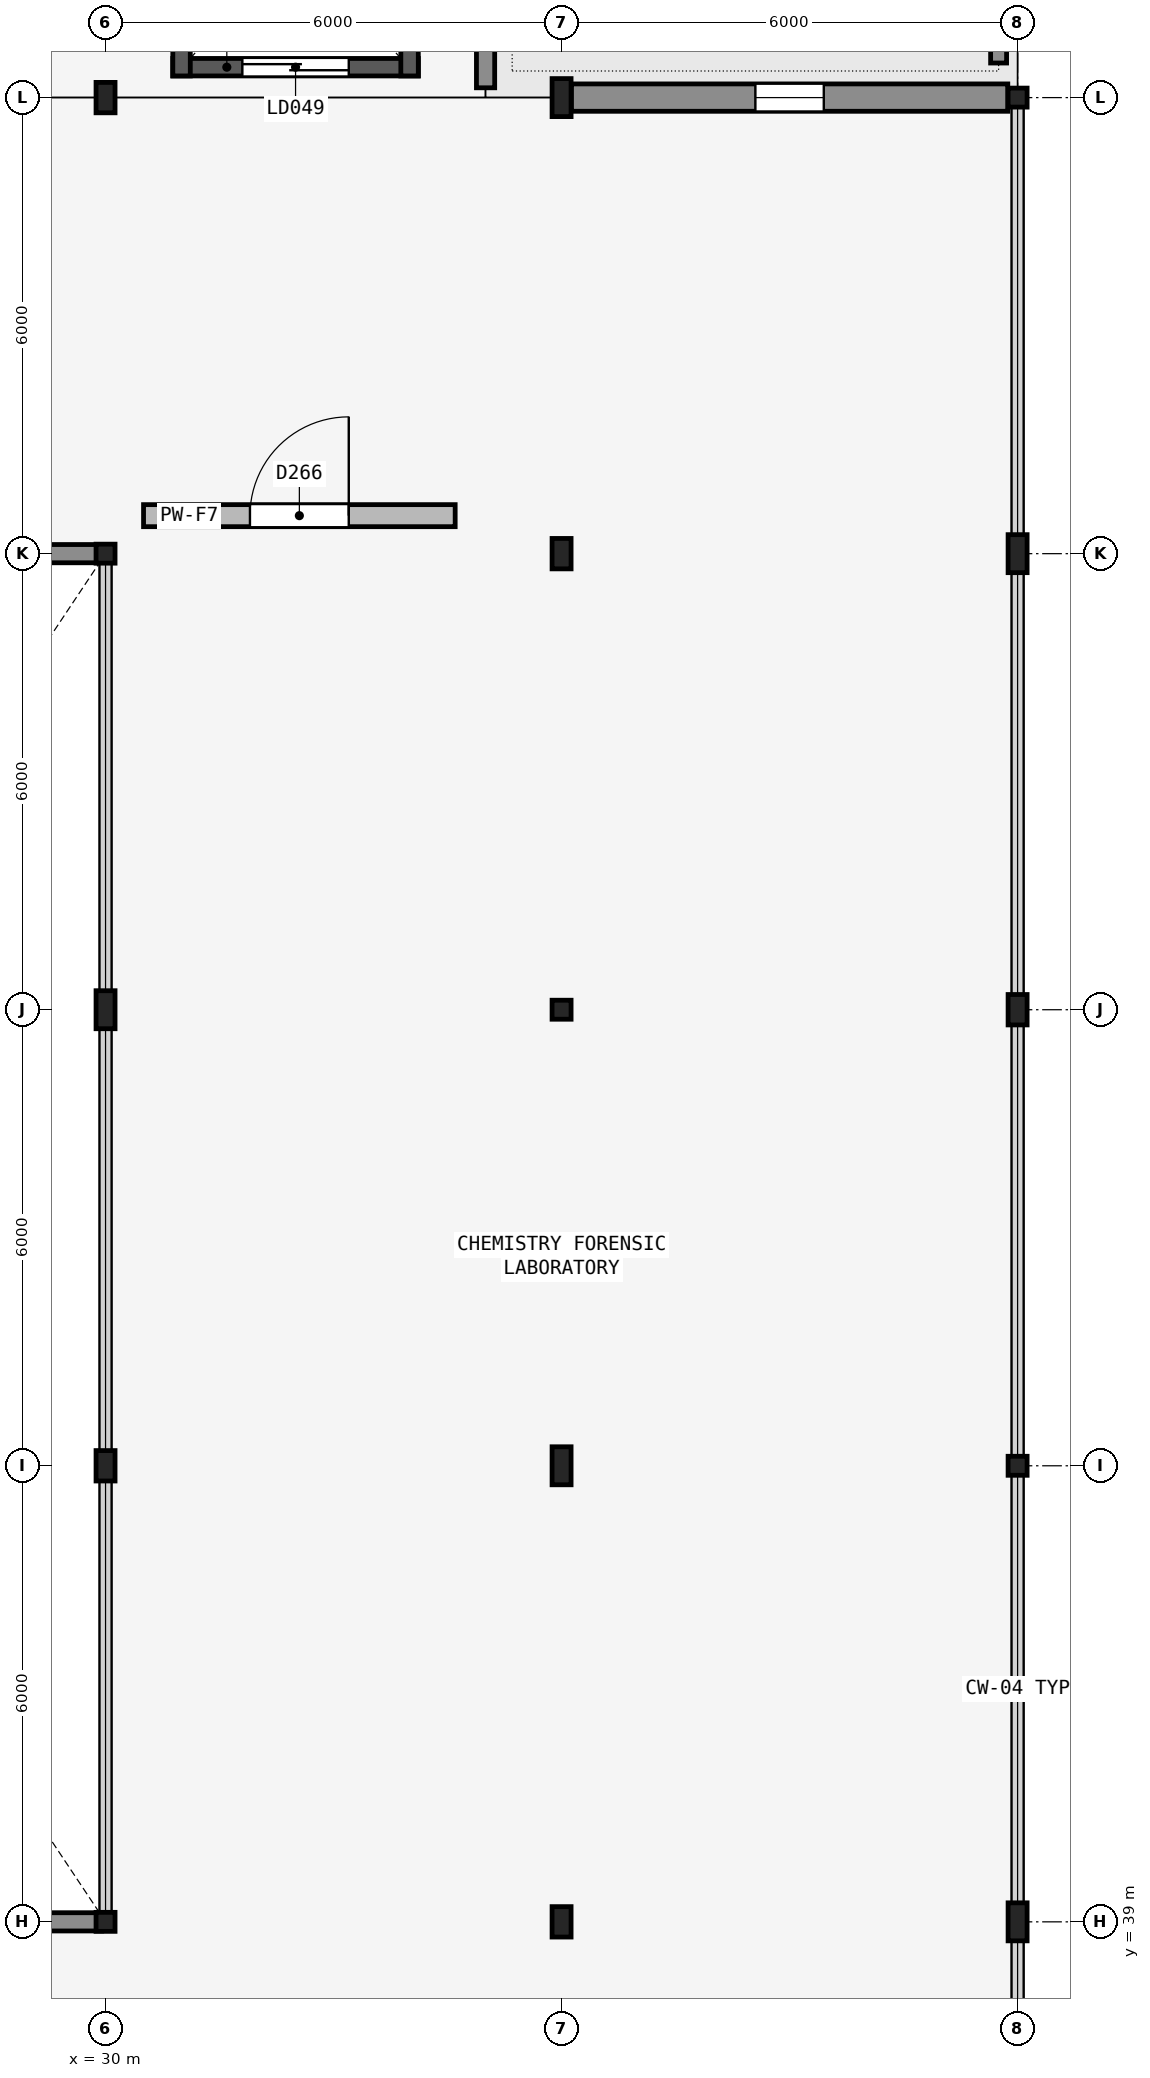
"""IFC4 building model, lengths in metres.
Left out: names, types, materials, properties, quantities, classifications, styles, units other than length and angle.
Written with IfcOpenShell. Run it as: python <this file> out.ifc"""

import sys

from ifc_helpers import new_model, si_unit, direction, frame, frame_2d, origin, origin_2d, place, context, subcontext, project, spatial, rectangle, hollow_rectangle, i_section, extrude, element, fill, save


model = new_model("IFC4")
c1 = context("Model", 3, precision=1e-05, world=origin(), true_north=direction((0.0, 1.0)))
c2 = subcontext(c1, "Body", "Model", "MODEL_VIEW")
j1 = project(units=[si_unit("LENGTHUNIT", "METRE"), si_unit("PLANEANGLEUNIT", "RADIAN")], contexts=[c1])
p1 = place(None, origin())
s1 = spatial("IfcSite", under=j1, at=p1, CompositionType="ELEMENT")
p2 = place(p1, origin())
s2 = spatial("IfcBuilding", under=s1, at=p2, CompositionType="ELEMENT")
p3 = place(p2, frame((0.0, 0.0, 18.0)))
s3 = spatial("IfcBuildingStorey", under=s2, at=p3, CompositionType="ELEMENT", Elevation=18.0)
p4 = place(p3, frame((30.0, 39.0, 0.0), z_axis=(0.0, 0.0, 1.0), x_axis=(1.0, 0.0, 0.0)))
e1 = element("IfcColumn", 1, at=p4, inside=s3, PredefinedType="COLUMN", context=c2, shape_type="SweptSolid", body=[
    extrude(hollow_rectangle(XDim=0.25, YDim=0.25, WallThickness=0.012, InnerFilletRadius=0.012, OuterFilletRadius=0.024, at=origin_2d()), origin(), (0.0, 0.0, 1.0), 4.2),
])
p5 = place(p3, frame((30.0, 45.0, 0.0), z_axis=(0.0, 0.0, 1.0), x_axis=(1.0, 0.0, 0.0)))
e2 = element("IfcColumn", 2, at=p5, inside=s3, PredefinedType="COLUMN", context=c2, shape_type="SweptSolid", body=[
    extrude(i_section(OverallWidth=0.25, OverallDepth=0.4, WebThickness=0.01, FlangeThickness=0.013, FilletRadius=0.014, at=origin_2d()), origin(), (0.0, 0.0, 1.0), 4.2),
])
p6 = place(p3, frame((30.0, 51.0, 0.0), z_axis=(0.0, 0.0, 1.0), x_axis=(1.0, 0.0, 0.0)))
e3 = element("IfcColumn", 3, at=p6, inside=s3, PredefinedType="COLUMN", context=c2, shape_type="SweptSolid", body=[
    extrude(i_section(OverallWidth=0.25, OverallDepth=0.5, WebThickness=0.01, FlangeThickness=0.015, FilletRadius=0.015, at=origin_2d()), origin(), (0.0, 0.0, 1.0), 4.2),
])
p7 = place(p3, frame((30.0, 57.0, 0.0), z_axis=(0.0, 0.0, 1.0), x_axis=(1.0, 0.0, 0.0)))
e4 = element("IfcColumn", 4, at=p7, inside=s3, PredefinedType="COLUMN", context=c2, shape_type="SweptSolid", body=[
    extrude(hollow_rectangle(XDim=0.25, YDim=0.25, WallThickness=0.012, InnerFilletRadius=0.012, OuterFilletRadius=0.024, at=origin_2d()), origin(), (0.0, 0.0, 1.0), 4.2),
])
for number, where, z_axis, x_axis in (
    (5, (30.0, 63.0, 0.0), (0.0, 0.0, 1.0), (1.0, 0.0, 0.0)),
    (6, (36.0, 39.0, 0.0), (0.0, 0.0, 1.0), (1.0, 0.0, 0.0)),
):
    element("IfcColumn", number, at=place(p3, frame(where, z_axis=z_axis, x_axis=x_axis)), inside=s3, PredefinedType="COLUMN", context=c2, shape_type="SweptSolid", body=[
        extrude(i_section(OverallWidth=0.25, OverallDepth=0.4, WebThickness=0.01, FlangeThickness=0.013, FilletRadius=0.014, at=origin_2d()), origin(), (0.0, 0.0, 1.0), 4.2),
    ])
p8 = place(p3, frame((36.0, 45.0, 0.0), z_axis=(0.0, 0.0, 1.0), x_axis=(1.0, 0.0, 0.0)))
e7 = element("IfcColumn", 7, at=p8, inside=s3, PredefinedType="COLUMN", context=c2, shape_type="SweptSolid", body=[
    extrude(i_section(OverallWidth=0.25, OverallDepth=0.5, WebThickness=0.01, FlangeThickness=0.015, FilletRadius=0.015, at=origin_2d()), origin(), (0.0, 0.0, 1.0), 4.2),
])
p9 = place(p3, frame((36.0, 51.0, 0.0), z_axis=(0.0, 0.0, 1.0), x_axis=(1.0, 0.0, 0.0)))
e8 = element("IfcColumn", 8, at=p9, inside=s3, PredefinedType="COLUMN", context=c2, shape_type="SweptSolid", body=[
    extrude(hollow_rectangle(XDim=0.25, YDim=0.25, WallThickness=0.012, InnerFilletRadius=0.012, OuterFilletRadius=0.024, at=origin_2d()), origin(), (0.0, 0.0, 1.0), 4.2),
])
p10 = place(p3, frame((36.0, 57.0, 0.0), z_axis=(0.0, 0.0, 1.0), x_axis=(1.0, 0.0, 0.0)))
e9 = element("IfcColumn", 9, at=p10, inside=s3, PredefinedType="COLUMN", context=c2, shape_type="SweptSolid", body=[
    extrude(i_section(OverallWidth=0.25, OverallDepth=0.4, WebThickness=0.01, FlangeThickness=0.013, FilletRadius=0.014, at=origin_2d()), origin(), (0.0, 0.0, 1.0), 4.2),
])
for number, where, z_axis, x_axis in (
    (10, (36.0, 63.0, 0.0), (0.0, 0.0, 1.0), (1.0, 0.0, 0.0)),
    (11, (42.0, 39.0, 0.0), (0.0, 0.0, 1.0), (1.0, 0.0, 0.0)),
):
    element("IfcColumn", number, at=place(p3, frame(where, z_axis=z_axis, x_axis=x_axis)), inside=s3, PredefinedType="COLUMN", context=c2, shape_type="SweptSolid", body=[
        extrude(i_section(OverallWidth=0.25, OverallDepth=0.5, WebThickness=0.01, FlangeThickness=0.015, FilletRadius=0.015, at=origin_2d()), origin(), (0.0, 0.0, 1.0), 4.2),
    ])
p11 = place(p3, frame((42.0, 45.0, 0.0), z_axis=(0.0, 0.0, 1.0), x_axis=(1.0, 0.0, 0.0)))
e12 = element("IfcColumn", 12, at=p11, inside=s3, PredefinedType="COLUMN", context=c2, shape_type="SweptSolid", body=[
    extrude(hollow_rectangle(XDim=0.25, YDim=0.25, WallThickness=0.012, InnerFilletRadius=0.012, OuterFilletRadius=0.024, at=origin_2d()), origin(), (0.0, 0.0, 1.0), 4.2),
])
p12 = place(p3, frame((42.0, 51.0, 0.0), z_axis=(0.0, 0.0, 1.0), x_axis=(1.0, 0.0, 0.0)))
e13 = element("IfcColumn", 13, at=p12, inside=s3, PredefinedType="COLUMN", context=c2, shape_type="SweptSolid", body=[
    extrude(i_section(OverallWidth=0.25, OverallDepth=0.4, WebThickness=0.01, FlangeThickness=0.013, FilletRadius=0.014, at=origin_2d()), origin(), (0.0, 0.0, 1.0), 4.2),
])
p13 = place(p3, frame((42.0, 57.0, 0.0), z_axis=(0.0, 0.0, 1.0), x_axis=(1.0, 0.0, 0.0)))
e14 = element("IfcColumn", 14, at=p13, inside=s3, PredefinedType="COLUMN", context=c2, shape_type="SweptSolid", body=[
    extrude(i_section(OverallWidth=0.25, OverallDepth=0.5, WebThickness=0.01, FlangeThickness=0.015, FilletRadius=0.015, at=origin_2d()), origin(), (0.0, 0.0, 1.0), 4.2),
])
p14 = place(p3, frame((42.0, 63.0, 0.0), z_axis=(0.0, 0.0, 1.0), x_axis=(1.0, 0.0, 0.0)))
e15 = element("IfcColumn", 15, at=p14, inside=s3, PredefinedType="COLUMN", context=c2, shape_type="SweptSolid", body=[
    extrude(hollow_rectangle(XDim=0.25, YDim=0.25, WallThickness=0.012, InnerFilletRadius=0.012, OuterFilletRadius=0.024, at=origin_2d()), origin(), (0.0, 0.0, 1.0), 4.2),
])
p15 = place(p3, frame((36.129, 63.0, 0.0), z_axis=(0.0, 0.0, 1.0), x_axis=(1.0, 0.0, 0.0)))
e16 = element("IfcWall", 16, at=p15, inside=s3, PredefinedType="SOLIDWALL", context=c2, shape_type="SweptSolid", body=[
    extrude(rectangle(XDim=5.742, YDim=0.36, at=frame_2d((2.871, 0.0))), origin(), (0.0, 0.0, 1.0), 3.44),
])
p16 = place(p15, frame((2.421, 0.0, 1.0)))
e17 = element("IfcOpeningElement", 17, at=p16, cuts=e16, PredefinedType="OPENING", context=c2, shape_type="SweptSolid", body=[
    extrude(rectangle(XDim=0.9, YDim=1.5, at=frame_2d((0.45, 0.75))), frame((0.0, 0.19, 0.0), z_axis=(0.0, -1.0, 0.0), x_axis=(1.0, 0.0, 0.0)), (0.0, 0.0, 1.0), 0.38),
])
p17 = place(p3, frame((24.0, 39.0, 0.0), z_axis=(0.0, 0.0, 1.0), x_axis=(1.0, 0.0, 0.0)))
e18 = element("IfcWall", 18, at=p17, inside=s3, PredefinedType="SOLIDWALL", context=c2, shape_type="SweptSolid", body=[
    extrude(rectangle(XDim=5.95, YDim=0.24, at=frame_2d((2.975, 0.0))), origin(), (0.0, 0.0, 1.0), 3.39),
])
p18 = place(p17, frame((2.275, 0.0, 0.85)))
e19 = element("IfcOpeningElement", 19, at=p18, cuts=e18, PredefinedType="OPENING", context=c2, shape_type="SweptSolid", body=[
    extrude(rectangle(XDim=1.4, YDim=1.8, at=frame_2d((0.7, 0.9))), frame((0.0, 0.13, 0.0), z_axis=(0.0, -1.0, 0.0), x_axis=(1.0, 0.0, 0.0)), (0.0, 0.0, 1.0), 0.26),
])
p19 = place(p3, frame((24.0, 57.0, 0.0), z_axis=(0.0, 0.0, 1.0), x_axis=(1.0, 0.0, 0.0)))
e20 = element("IfcWall", 20, at=p19, inside=s3, PredefinedType="SOLIDWALL", context=c2, shape_type="SweptSolid", body=[
    extrude(rectangle(XDim=5.95, YDim=0.24, at=frame_2d((2.975, 0.0))), origin(), (0.0, 0.0, 1.0), 3.29),
])
p20 = place(p19, frame((2.275, 0.0, 0.85)))
e21 = element("IfcOpeningElement", 21, at=p20, cuts=e20, PredefinedType="OPENING", context=c2, shape_type="SweptSolid", body=[
    extrude(rectangle(XDim=1.4, YDim=1.8, at=frame_2d((0.7, 0.9))), frame((0.0, 0.13, 0.0), z_axis=(0.0, -1.0, 0.0), x_axis=(1.0, 0.0, 0.0)), (0.0, 0.0, 1.0), 0.26),
])
p21 = place(p3, frame((41.75, 63.455, 0.0), z_axis=(0.0, 0.0, 1.0), x_axis=(0.0, 1.0, 0.0)))
e22 = element("IfcWall", 22, at=p21, inside=s3, PredefinedType="PARAPET", context=c2, shape_type="SweptSolid", body=[
    extrude(rectangle(XDim=11.19, YDim=0.21, at=frame_2d((5.595, 0.0))), origin(), (0.0, 0.0, 1.0), 1.1),
])
p22 = place(p3, frame((35.0, 63.129, 0.0), z_axis=(0.0, 0.0, 1.0), x_axis=(0.0, 1.0, 0.0)))
e23 = element("IfcWall", 23, at=p22, inside=s3, PredefinedType="SOLIDWALL", context=c2, shape_type="SweptSolid", body=[
    extrude(rectangle(XDim=11.746, YDim=0.24, at=frame_2d((5.873, 0.0))), origin(), (0.0, 0.0, 1.0), 3.44),
])
p23 = place(p3, frame((30.885, 63.4, 0.0), z_axis=(0.0, 0.0, 1.0), x_axis=(1.0, 0.0, 0.0)))
e24 = element("IfcWall", 24, at=p23, inside=s3, PredefinedType="SHEAR", context=c2, shape_type="SweptSolid", body=[
    extrude(rectangle(XDim=3.23, YDim=0.23, at=frame_2d((1.615, 0.0))), origin(), (0.0, 0.0, 1.0), 4.2),
])
p24 = place(p23, frame((0.915, 0.0, 0.0)))
e25 = element("IfcOpeningElement", 25, at=p24, cuts=e24, PredefinedType="OPENING", context=c2, shape_type="SweptSolid", body=[
    extrude(rectangle(XDim=1.4, YDim=2.3, at=frame_2d((0.7, 1.15))), frame((0.0, 0.125, 0.0), z_axis=(0.0, -1.0, 0.0), x_axis=(1.0, 0.0, 0.0)), (0.0, 0.0, 1.0), 0.25),
])
for number, where, z_axis, x_axis in (
    (26, (34.0, 63.285, 0.0), (0.0, 0.0, 1.0), (0.0, 1.0, 0.0)),
    (27, (31.0, 66.915, 0.0), (0.0, 0.0, 1.0), (0.0, -1.0, 0.0)),
):
    element("IfcWall", number, at=place(p3, frame(where, z_axis=z_axis, x_axis=x_axis)), inside=s3, PredefinedType="SHEAR", context=c2, shape_type="SweptSolid", body=[
        extrude(rectangle(XDim=3.63, YDim=0.23, at=frame_2d((1.815, 0.0))), origin(), (0.0, 0.0, 1.0), 4.2),
    ])
p25 = place(p3, frame((30.5, 57.5, 0.0), z_axis=(0.0, 0.0, 1.0), x_axis=(1.0, 0.0, 0.0)))
e28 = element("IfcWall", 28, at=p25, inside=s3, PredefinedType="PARTITIONING", context=c2, shape_type="SweptSolid", body=[
    extrude(rectangle(XDim=4.1, YDim=0.29, at=frame_2d((2.05, 0.0))), origin(), (0.0, 0.0, 1.0), 3.54),
])
p26 = place(p25, frame((1.4, 0.0, 0.0)))
e29 = element("IfcOpeningElement", 29, at=p26, cuts=e28, PredefinedType="OPENING", context=c2, shape_type="SweptSolid", body=[
    extrude(rectangle(XDim=1.3, YDim=2.2, at=frame_2d((0.65, 1.1))), frame((0.0, 0.155, 0.0), z_axis=(0.0, -1.0, 0.0), x_axis=(1.0, 0.0, 0.0)), (0.0, 0.0, 1.0), 0.31),
])
p27 = place(p16, origin())
e30 = element("IfcWindow", 30, at=p27, inside=s3, PartitioningType="SINGLE_PANEL", PredefinedType="WINDOW", context=c2, shape_type="SweptSolid", body=[
    extrude(rectangle(XDim=0.9, YDim=1.5, at=frame_2d((0.45, 0.75))), frame((0.0, 0.03, 0.0), z_axis=(0.0, -1.0, 0.0), x_axis=(1.0, 0.0, 0.0)), (0.0, 0.0, 1.0), 0.06),
])
fill(e17, e30)
p28 = place(p24, origin())
e31 = element("IfcDoor", 31, at=p28, inside=s3, OperationType="SLIDING_TO_LEFT", PredefinedType="DOOR", context=c2, shape_type="SweptSolid", body=[
    extrude(rectangle(XDim=1.4, YDim=2.3, at=frame_2d((0.7, 1.15))), frame((0.0, 0.025, 0.0), z_axis=(0.0, -1.0, 0.0), x_axis=(1.0, 0.0, 0.0)), (0.0, 0.0, 1.0), 0.05),
])
fill(e25, e31)
p29 = place(p26, origin())
e32 = element("IfcDoor", 32, at=p29, inside=s3, OperationType="SINGLE_SWING_RIGHT", PredefinedType="DOOR", context=c2, shape_type="SweptSolid", body=[
    extrude(rectangle(XDim=1.3, YDim=2.2, at=frame_2d((0.65, 1.1))), frame((0.0, 0.025, 0.0), z_axis=(0.0, -1.0, 0.0), x_axis=(1.0, 0.0, 0.0)), (0.0, 0.0, 1.0), 0.05),
])
fill(e29, e32)
save(model, sys.argv[1])
